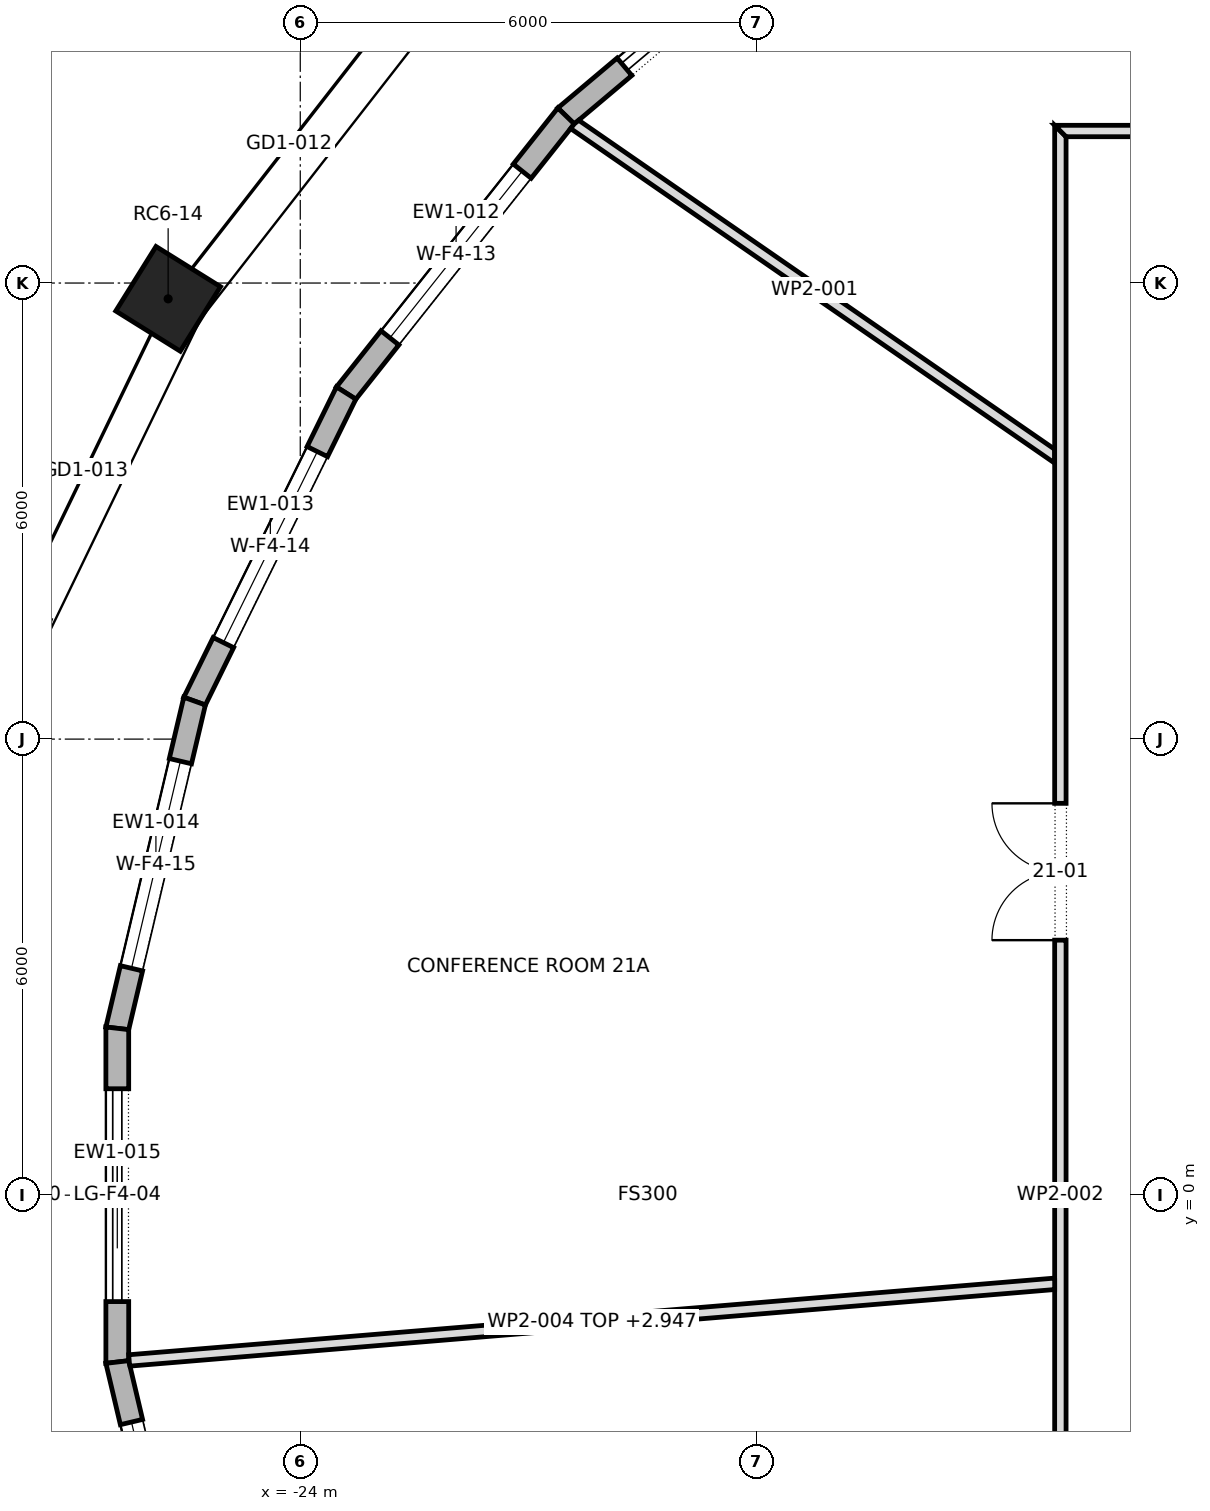
"""IFC4 building model, lengths in metres.
Left out: names, types, materials, properties, quantities, classifications, styles, units other than length and angle.
Written with IfcOpenShell. Run it as: python <this file> out.ifc"""

import sys

from ifc_helpers import new_model, si_unit, direction, frame, frame_2d, origin, origin_2d, place, context, subcontext, project, spatial, polyline, rectangle, outline, extrude, element, fill, save


model = new_model("IFC4")
c1 = context("Model", 3, precision=1e-05, world=origin(), true_north=direction((0.0, 1.0)))
c2 = subcontext(c1, "Body", "Model", "MODEL_VIEW")
j1 = project(units=[si_unit("LENGTHUNIT", "METRE"), si_unit("PLANEANGLEUNIT", "RADIAN")], contexts=[c1])
p1 = place(None, origin())
s1 = spatial("IfcSite", under=j1, at=p1, CompositionType="ELEMENT")
p2 = place(p1, origin())
s2 = spatial("IfcBuilding", under=s1, at=p2, CompositionType="ELEMENT")
p3 = place(p2, frame((0.0, 0.0, 292.3)))
s3 = spatial("IfcBuildingStorey", under=s2, at=p3, CompositionType="ELEMENT", Elevation=292.3)
p4 = place(p3, frame((-25.738, 11.792, 0.0), z_axis=(0.0, 0.0, 1.0), x_axis=(-0.529141977228, -0.848533303964, 0.0)))
e1 = element("IfcColumn", 1, at=p4, inside=s3, PredefinedType="COLUMN", context=c2, shape_type="SweptSolid", body=[
    extrude(rectangle(XDim=1.0, YDim=1.0, at=origin_2d()), origin(), (0.0, 0.0, 1.0), 4.0),
])
p5 = place(p3, frame((-16.824, 17.296, 0.0), z_axis=(0.0, 0.0, 1.0), x_axis=(-0.764966473721, -0.644070100286, 0.0)))
e2 = element("IfcWall", 2, at=p5, inside=s3, PredefinedType="STANDARD", context=c2, shape_type="SweptSolid", body=[
    extrude(outline(polyline([(-0.014, -0.15), (4.825, -0.15), (4.795, 0.15), (0.014, 0.15), (-0.014, -0.15)])), origin(), (0.0, 0.0, 1.0), 3.7),
])
p6 = place(p5, frame((1.005, 0.0, 0.0)))
e3 = element("IfcOpeningElement", 3, at=p6, cuts=e2, PredefinedType="OPENING", context=c2, shape_type="SweptSolid", body=[
    extrude(rectangle(XDim=2.8, YDim=3.25, at=frame_2d((1.4, 1.625))), frame((0.0, 0.162, 0.0), z_axis=(0.0, -1.0, 0.0), x_axis=(1.0, 0.0, 0.0)), (0.0, 0.0, 1.0), 0.324),
])
p7 = place(p3, frame((-20.503, 14.198, 0.0), z_axis=(0.0, 0.0, 1.0), x_axis=(-0.621625671247, -0.783314448256, 0.0)))
e4 = element("IfcWall", 4, at=p7, inside=s3, PredefinedType="STANDARD", context=c2, shape_type="SweptSolid", body=[
    extrude(outline(polyline([(-0.015, -0.15), (4.67, -0.15), (4.637, 0.15), (0.015, 0.15), (-0.015, -0.15)])), origin(), (0.0, 0.0, 1.0), 3.7),
])
p8 = place(p7, frame((0.927, 0.0, 0.6)))
e5 = element("IfcOpeningElement", 5, at=p8, cuts=e4, PredefinedType="OPENING", context=c2, shape_type="SweptSolid", body=[
    extrude(rectangle(XDim=2.8, YDim=2.65, at=frame_2d((1.4, 1.325))), frame((0.0, 0.162, 0.0), z_axis=(0.0, -1.0, 0.0), x_axis=(1.0, 0.0, 0.0)), (0.0, 0.0, 1.0), 0.324),
])
p9 = place(p3, frame((-23.396, 10.553, 0.0), z_axis=(0.0, 0.0, 1.0), x_axis=(-0.441431671743, -0.897294867467, 0.0)))
e6 = element("IfcWall", 6, at=p9, inside=s3, PredefinedType="STANDARD", context=c2, shape_type="SweptSolid", body=[
    extrude(outline(polyline([(-0.016, -0.15), (4.534, -0.15), (4.5, 0.15), (0.016, 0.15), (-0.016, -0.15)])), origin(), (0.0, 0.0, 1.0), 3.7),
])
p10 = place(p9, frame((0.858, 0.0, 0.6)))
e7 = element("IfcOpeningElement", 7, at=p10, cuts=e6, PredefinedType="OPENING", context=c2, shape_type="SweptSolid", body=[
    extrude(rectangle(XDim=2.8, YDim=2.65, at=frame_2d((1.4, 1.325))), frame((0.0, 0.162, 0.0), z_axis=(0.0, -1.0, 0.0), x_axis=(1.0, 0.0, 0.0)), (0.0, 0.0, 1.0), 0.324),
])
p11 = place(p3, frame((-25.39, 6.5, 0.0), z_axis=(0.0, 0.0, 1.0), x_axis=(-0.229943714271, -0.973203929435, 0.0)))
e8 = element("IfcWall", 8, at=p11, inside=s3, PredefinedType="STANDARD", context=c2, shape_type="SweptSolid", body=[
    extrude(outline(polyline([(-0.017, -0.15), (4.441, -0.15), (4.406, 0.15), (0.017, 0.15), (-0.017, -0.15)])), origin(), (0.0, 0.0, 1.0), 3.7),
])
p12 = place(p11, frame((0.812, 0.0, 0.6)))
e9 = element("IfcOpeningElement", 9, at=p12, cuts=e8, PredefinedType="OPENING", context=c2, shape_type="SweptSolid", body=[
    extrude(rectangle(XDim=2.8, YDim=2.65, at=frame_2d((1.4, 1.325))), frame((0.0, 0.162, 0.0), z_axis=(0.0, -1.0, 0.0), x_axis=(1.0, 0.0, 0.0)), (0.0, 0.0, 1.0), 0.324),
])
p13 = place(p3, frame((-26.407, 2.195, 0.0), z_axis=(0.0, 0.0, 1.0), x_axis=(0.0, -1.0, 0.0)))
e10 = element("IfcWall", 10, at=p13, inside=s3, PredefinedType="STANDARD", context=c2, shape_type="SweptSolid", body=[
    extrude(outline(polyline([(-0.018, -0.15), (4.408, -0.15), (4.373, 0.15), (0.018, 0.15), (-0.018, -0.15)])), origin(), (0.0, 0.0, 1.0), 3.7),
])
p14 = place(p13, frame((0.795, 0.0, 0.0)))
e11 = element("IfcOpeningElement", 11, at=p14, cuts=e10, PredefinedType="OPENING", context=c2, shape_type="SweptSolid", body=[
    extrude(rectangle(XDim=2.8, YDim=3.25, at=frame_2d((1.4, 1.625))), frame((0.0, 0.162, 0.0), z_axis=(0.0, -1.0, 0.0), x_axis=(1.0, 0.0, 0.0)), (0.0, 0.0, 1.0), 0.324),
])
p15 = place(p3, frame((-26.407, -2.195, 0.0), z_axis=(0.0, 0.0, 1.0), x_axis=(0.229943714271, -0.973203929435, 0.0)))
e12 = element("IfcWall", 12, at=p15, inside=s3, PredefinedType="STANDARD", context=c2, shape_type="SweptSolid", body=[
    extrude(outline(polyline([(-0.018, -0.15), (4.44, -0.15), (4.406, 0.15), (0.018, 0.15), (-0.018, -0.15)])), origin(), (0.0, 0.0, 1.0), 3.7),
])
p16 = place(p15, frame((0.812, 0.0, 0.6)))
e13 = element("IfcOpeningElement", 13, at=p16, cuts=e12, PredefinedType="OPENING", context=c2, shape_type="SweptSolid", body=[
    extrude(rectangle(XDim=2.8, YDim=2.65, at=frame_2d((1.4, 1.325))), frame((0.0, 0.162, 0.0), z_axis=(0.0, -1.0, 0.0), x_axis=(1.0, 0.0, 0.0)), (0.0, 0.0, 1.0), 0.324),
])
p17 = place(p3, frame((-20.4, 14.094, 0.0), z_axis=(0.0, 0.0, 1.0), x_axis=(0.822587107867, -0.568639121035, 0.0)))
e14 = element("IfcWall", 14, at=p17, inside=s3, PredefinedType="PARTITIONING", context=c2, shape_type="SweptSolid", body=[
    extrude(outline(polyline([(7.741, -0.075), (7.741, -0.075), (7.637, 0.075), (5.734, 0.075), (3.831, 0.075), (1.928, 0.075), (0.025, 0.075), (0.005, 0.002), (0.0, -0.07), (0.0, -0.075), (1.935, -0.075), (3.871, -0.075), (5.806, -0.075), (7.741, -0.075)])), origin(), (0.0, 0.0, 1.0), 3.7),
])
p18 = place(p3, frame((-14.0, -14.075, 0.0), z_axis=(0.0, 0.0, 1.0), x_axis=(0.0, 1.0, 0.0)))
e15 = element("IfcWall", 15, at=p18, inside=s3, PredefinedType="PARTITIONING", context=c2, shape_type="SweptSolid", body=[
    extrude(outline(polyline([(0.15, -0.075), (2.139, -0.075), (4.128, -0.075), (6.118, -0.075), (8.107, -0.075), (10.096, -0.075), (12.086, -0.075), (14.075, -0.075), (16.064, -0.075), (18.053, -0.075), (20.043, -0.075), (22.032, -0.075), (24.021, -0.075), (26.011, -0.075), (28.0, -0.075), (28.15, 0.075), (26.273, 0.075), (24.396, 0.075), (22.52, 0.075), (20.643, 0.075), (18.767, 0.075), (16.89, 0.075), (15.013, 0.075), (13.137, 0.075), (11.26, 0.075), (9.383, 0.075), (7.507, 0.075), (5.63, 0.075), (3.753, 0.075), (1.877, 0.075), (0.0, 0.075), (0.15, -0.075)])), origin(), (0.0, 0.0, 1.0), 3.7),
])
p19 = place(p18, frame((17.43, 0.0, 0.0)))
e16 = element("IfcOpeningElement", 16, at=p19, cuts=e15, PredefinedType="OPENING", context=c2, shape_type="SweptSolid", body=[
    extrude(rectangle(XDim=1.8, YDim=2.1, at=frame_2d((0.9, 1.05))), frame((0.0, 0.087, 0.0), z_axis=(0.0, -1.0, 0.0), x_axis=(1.0, 0.0, 0.0)), (0.0, 0.0, 1.0), 0.174),
])
p20 = place(p18, frame((5.995, 0.0, 0.0)))
e17 = element("IfcOpeningElement", 17, at=p20, cuts=e15, PredefinedType="OPENING", context=c2, shape_type="SweptSolid", body=[
    extrude(rectangle(XDim=1.0, YDim=2.1, at=frame_2d((0.5, 1.05))), frame((0.0, 0.087, 0.0), z_axis=(0.0, -1.0, 0.0), x_axis=(1.0, 0.0, 0.0)), (0.0, 0.0, 1.0), 0.174),
])
p21 = place(p3, frame((-14.069, -1.166, 0.0), z_axis=(0.0, 0.0, 1.0), x_axis=(-0.99659010846, -0.082511549014, 0.0)))
e18 = element("IfcWall", 18, at=p21, inside=s3, PredefinedType="PARTITIONING", context=c2, shape_type="SweptSolid", body=[
    extrude(outline(polyline([(12.223, -0.075), (12.223, 0.047), (12.219, 0.075), (10.475, 0.075), (8.731, 0.075), (6.987, 0.075), (5.243, 0.075), (3.5, 0.075), (1.756, 0.075), (0.012, 0.075), (0.0, -0.069), (0.0, -0.075), (1.746, -0.075), (3.492, -0.075), (5.239, -0.075), (6.985, -0.075), (8.731, -0.075), (10.477, -0.075), (12.223, -0.075)])), origin(), (0.0, 0.0, 1.0), 2.947),
])
p22 = place(p3, frame((-14.075, 14.0, 0.0), z_axis=(0.0, 0.0, 1.0), x_axis=(1.0, 0.0, 0.0)))
e19 = element("IfcWall", 19, at=p22, inside=s3, PredefinedType="PARTITIONING", context=c2, shape_type="SweptSolid", body=[
    extrude(outline(polyline([(0.15, -0.075), (2.139, -0.075), (4.128, -0.075), (6.118, -0.075), (8.107, -0.075), (10.096, -0.075), (12.086, -0.075), (14.075, -0.075), (16.064, -0.075), (18.053, -0.075), (20.043, -0.075), (22.032, -0.075), (24.021, -0.075), (26.011, -0.075), (28.0, -0.075), (28.15, 0.075), (26.273, 0.075), (24.396, 0.075), (22.52, 0.075), (20.643, 0.075), (18.767, 0.075), (16.89, 0.075), (15.013, 0.075), (13.137, 0.075), (11.26, 0.075), (9.383, 0.075), (7.507, 0.075), (5.63, 0.075), (3.753, 0.075), (1.877, 0.075), (0.0, 0.075), (0.15, -0.075)])), origin(), (0.0, 0.0, 1.0), 3.7),
])
p23 = place(p22, frame((8.695, 0.0, 0.0)))
e20 = element("IfcOpeningElement", 20, at=p23, cuts=e19, PredefinedType="OPENING", context=c2, shape_type="SweptSolid", body=[
    extrude(rectangle(XDim=1.8, YDim=2.1, at=frame_2d((0.9, 1.05))), frame((0.0, 0.087, 0.0), z_axis=(0.0, -1.0, 0.0), x_axis=(1.0, 0.0, 0.0)), (0.0, 0.0, 1.0), 0.174),
])
p24 = place(p6, origin())
e21 = element("IfcDoor", 21, at=p24, inside=s3, OperationType="DOUBLE_DOOR_SLIDING", PredefinedType="DOOR", context=c2, shape_type="SweptSolid", body=[
    extrude(rectangle(XDim=2.8, YDim=3.25, at=frame_2d((1.4, 1.625))), frame((0.0, 0.025, 0.0), z_axis=(0.0, -1.0, 0.0), x_axis=(1.0, 0.0, 0.0)), (0.0, 0.0, 1.0), 0.05),
])
fill(e3, e21)
p25 = place(p8, origin())
e22 = element("IfcWindow", 22, at=p25, inside=s3, PartitioningType="DOUBLE_PANEL_VERTICAL", PredefinedType="WINDOW", context=c2, shape_type="SweptSolid", body=[
    extrude(rectangle(XDim=2.8, YDim=2.65, at=frame_2d((1.4, 1.325))), frame((0.0, 0.03, 0.0), z_axis=(0.0, -1.0, 0.0), x_axis=(1.0, 0.0, 0.0)), (0.0, 0.0, 1.0), 0.06),
])
fill(e5, e22)
p26 = place(p10, origin())
e23 = element("IfcWindow", 23, at=p26, inside=s3, PartitioningType="DOUBLE_PANEL_VERTICAL", PredefinedType="WINDOW", context=c2, shape_type="SweptSolid", body=[
    extrude(rectangle(XDim=2.8, YDim=2.65, at=frame_2d((1.4, 1.325))), frame((0.0, 0.03, 0.0), z_axis=(0.0, -1.0, 0.0), x_axis=(1.0, 0.0, 0.0)), (0.0, 0.0, 1.0), 0.06),
])
fill(e7, e23)
p27 = place(p12, origin())
e24 = element("IfcWindow", 24, at=p27, inside=s3, PartitioningType="DOUBLE_PANEL_VERTICAL", PredefinedType="WINDOW", context=c2, shape_type="SweptSolid", body=[
    extrude(rectangle(XDim=2.8, YDim=2.65, at=frame_2d((1.4, 1.325))), frame((0.0, 0.03, 0.0), z_axis=(0.0, -1.0, 0.0), x_axis=(1.0, 0.0, 0.0)), (0.0, 0.0, 1.0), 0.06),
])
fill(e9, e24)
p28 = place(p14, origin())
e25 = element("IfcDoor", 25, at=p28, inside=s3, OperationType="DOUBLE_DOOR_SLIDING", PredefinedType="DOOR", context=c2, shape_type="SweptSolid", body=[
    extrude(rectangle(XDim=2.8, YDim=3.25, at=frame_2d((1.4, 1.625))), frame((0.0, 0.025, 0.0), z_axis=(0.0, -1.0, 0.0), x_axis=(1.0, 0.0, 0.0)), (0.0, 0.0, 1.0), 0.05),
])
fill(e11, e25)
p29 = place(p16, origin())
e26 = element("IfcWindow", 26, at=p29, inside=s3, PartitioningType="DOUBLE_PANEL_VERTICAL", PredefinedType="WINDOW", context=c2, shape_type="SweptSolid", body=[
    extrude(rectangle(XDim=2.8, YDim=2.65, at=frame_2d((1.4, 1.325))), frame((0.0, 0.03, 0.0), z_axis=(0.0, -1.0, 0.0), x_axis=(1.0, 0.0, 0.0)), (0.0, 0.0, 1.0), 0.06),
])
fill(e13, e26)
p30 = place(p19, origin())
e27 = element("IfcDoor", 27, at=p30, inside=s3, OperationType="DOUBLE_DOOR_SINGLE_SWING", PredefinedType="DOOR", context=c2, shape_type="SweptSolid", body=[
    extrude(rectangle(XDim=1.8, YDim=2.1, at=frame_2d((0.9, 1.05))), frame((0.0, 0.025, 0.0), z_axis=(0.0, -1.0, 0.0), x_axis=(1.0, 0.0, 0.0)), (0.0, 0.0, 1.0), 0.05),
])
fill(e16, e27)
save(model, sys.argv[1])
